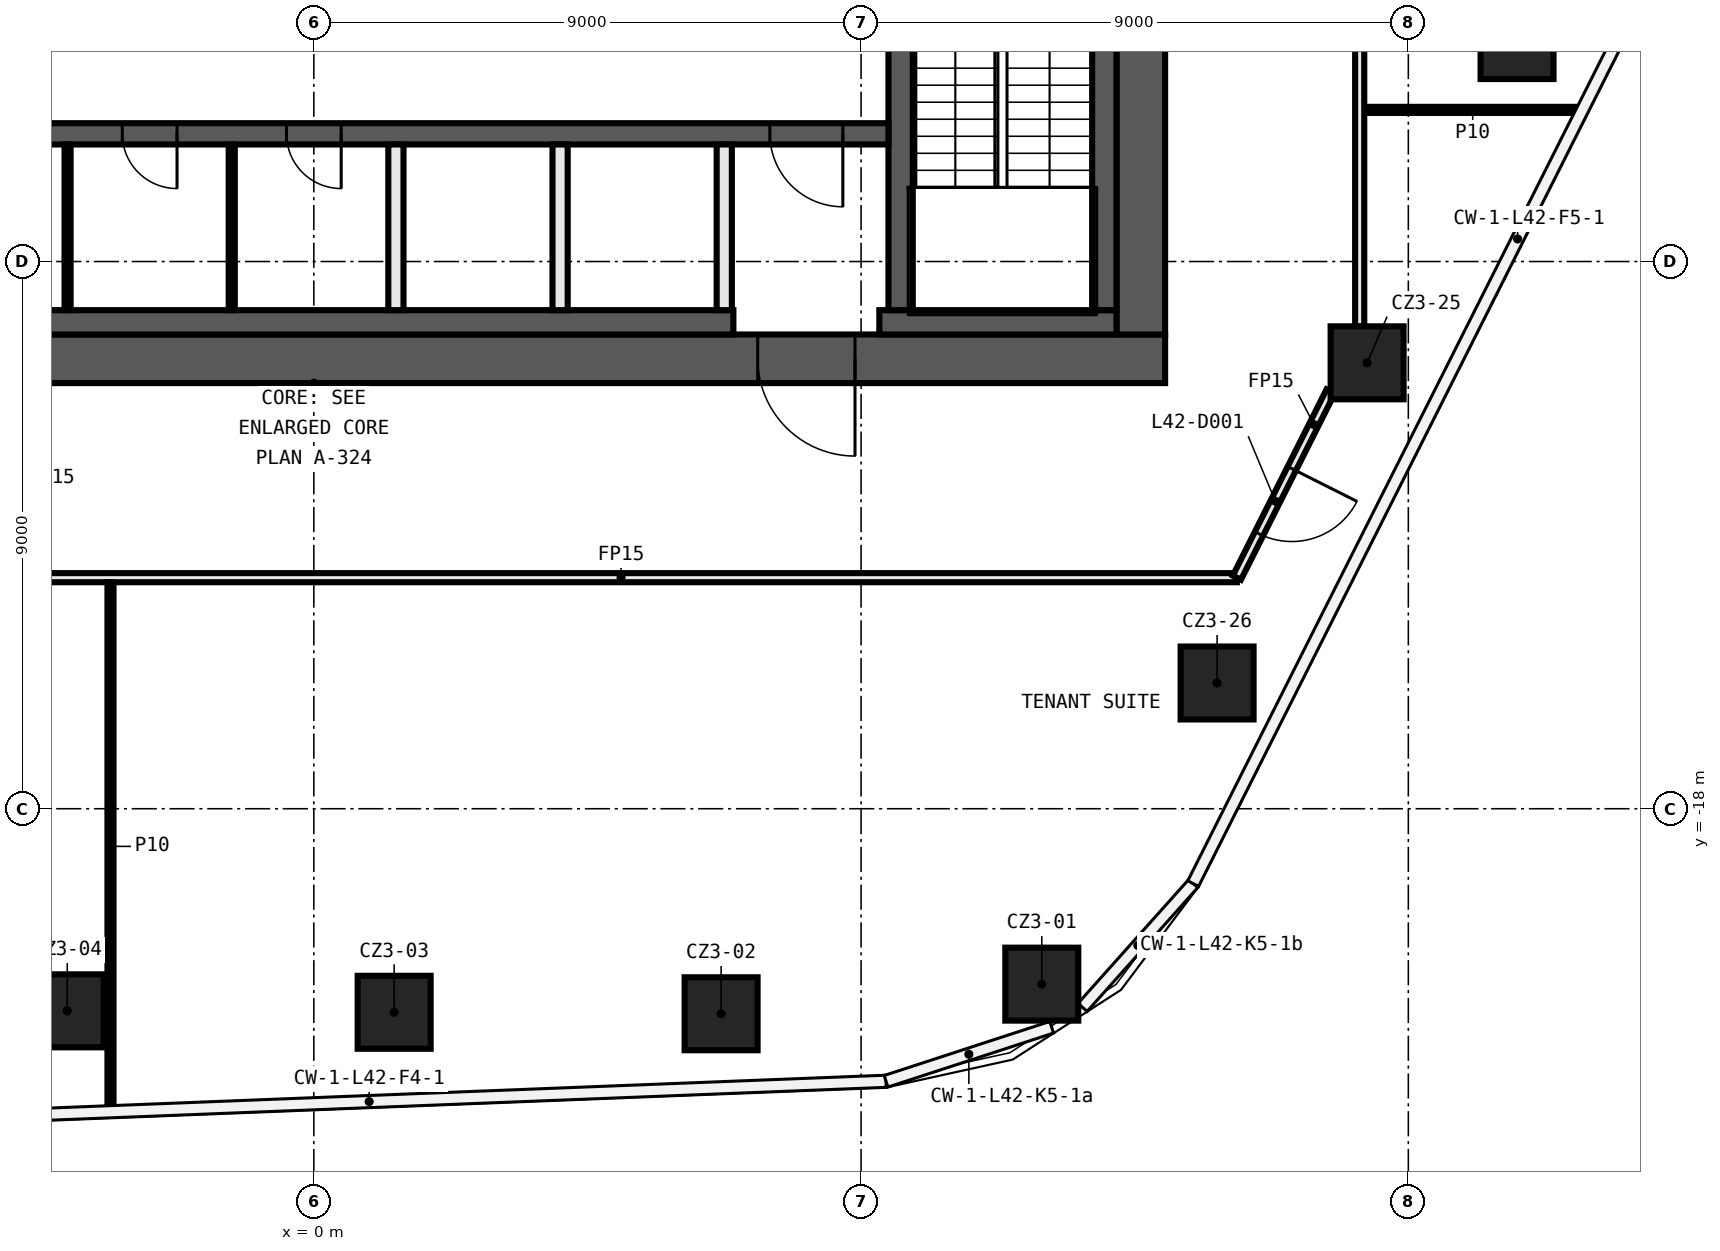
"""IFC4 building model, lengths in metres.
Left out: names, types, materials, properties, quantities, classifications, styles, units other than length and angle.
Written with IfcOpenShell. Run it as: python <this file> out.ifc"""

import sys

from ifc_helpers import new_model, si_unit, direction, frame, frame_2d, origin, origin_2d, place, context, subcontext, project, spatial, rectangle, extrude, element, fill, save


model = new_model("IFC4")
c1 = context("Model", 3, precision=1e-05, world=origin(), true_north=direction((0.0, 1.0)))
c2 = subcontext(c1, "Body", "Model", "MODEL_VIEW")
j1 = project(units=[si_unit("LENGTHUNIT", "METRE"), si_unit("PLANEANGLEUNIT", "RADIAN")], contexts=[c1])
p1 = place(None, origin())
s1 = spatial("IfcSite", under=j1, at=p1, CompositionType="ELEMENT")
p2 = place(p1, origin())
s2 = spatial("IfcBuilding", under=s1, at=p2, CompositionType="ELEMENT")
p3 = place(p2, frame((0.0, 0.0, 203.0)))
s3 = spatial("IfcBuildingStorey", under=s2, at=p3, CompositionType="ELEMENT", Elevation=203.0)
for number, where, z_axis, x_axis in (
    (1, (11.972, -20.885, 0.0), (0.0, 0.0, 1.0), (1.0, 0.0, 0.0)),
    (2, (6.698, -21.372, 0.0), (0.0, 0.0, 1.0), (1.0, 0.0, 0.0)),
    (3, (1.321, -21.348, 0.0), (0.0, 0.0, 1.0), (1.0, 0.0, 0.0)),
    (4, (-4.055, -21.324, 0.0), (0.0, 0.0, 1.0), (1.0, 0.0, 0.0)),
    (5, (19.788, -5.399, 0.0), (0.0, 0.0, 1.0), (1.0, 0.0, 0.0)),
    (6, (17.322, -10.666, 0.0), (0.0, 0.0, 1.0), (1.0, 0.0, 0.0)),
    (7, (14.855, -15.932, 0.0), (0.0, 0.0, 1.0), (1.0, 0.0, 0.0)),
):
    element("IfcColumn", number, at=place(p3, frame(where, z_axis=z_axis, x_axis=x_axis)), inside=s3, PredefinedType="COLUMN", context=c2, shape_type="SweptSolid", body=[
        extrude(rectangle(XDim=1.2, YDim=1.2, at=origin_2d()), origin(), (0.0, 0.0, 1.0), 3.82),
    ])
p4 = place(p3, frame((-5.075, -14.2, 0.0), z_axis=(0.0, 0.0, 1.0), x_axis=(1.0, 0.0, 0.0)))
e8 = element("IfcWall", 8, at=p4, inside=s3, PredefinedType="PARTITIONING", context=c2, shape_type="SweptSolid", body=[
    extrude(rectangle(XDim=20.255, YDim=0.15, at=frame_2d((10.127, 0.0))), origin(), (0.0, 0.0, 1.0), 3.82),
])
p5 = place(p3, frame((17.275, -6.506, 0.0), z_axis=(0.0, 0.0, 1.0), x_axis=(1.0, 0.0, 0.0)))
e9 = element("IfcWall", 9, at=p5, inside=s3, PredefinedType="PARTITIONING", context=c2, shape_type="SweptSolid", body=[
    extrude(rectangle(XDim=3.568, YDim=0.1, at=frame_2d((1.784, 0.0))), origin(), (0.0, 0.0, 1.0), 3.82),
])
p6 = place(p3, frame((16.722, -11.136, 0.0), z_axis=(0.0, 0.0, 1.0), x_axis=(-0.449461267312, -0.893299820433, 0.0)))
e10 = element("IfcWall", 10, at=p6, inside=s3, PredefinedType="PARTITIONING", context=c2, shape_type="SweptSolid", body=[
    extrude(rectangle(XDim=3.43, YDim=0.15, at=frame_2d((1.715, 0.0))), origin(), (0.0, 0.0, 1.0), 3.82),
])
p7 = place(p6, frame((1.421, 0.0, 0.0)))
e11 = element("IfcOpeningElement", 11, at=p7, cuts=e10, PredefinedType="OPENING", context=c2, shape_type="SweptSolid", body=[
    extrude(rectangle(XDim=1.2, YDim=2.1, at=frame_2d((0.6, 1.05))), frame((0.0, 0.085, 0.0), z_axis=(0.0, -1.0, 0.0), x_axis=(1.0, 0.0, 0.0)), (0.0, 0.0, 1.0), 0.17),
])
p8 = place(p3, frame((17.2, 13.106, 0.0), z_axis=(0.0, 0.0, 1.0), x_axis=(0.0, -1.0, 0.0)))
e12 = element("IfcWall", 12, at=p8, inside=s3, PredefinedType="PARTITIONING", context=c2, shape_type="SweptSolid", body=[
    extrude(rectangle(XDim=23.172, YDim=0.15, at=frame_2d((11.586, 0.0))), origin(), (0.0, 0.0, 1.0), 3.82),
])
p9 = place(p8, frame((4.412, 0.0, 0.0)))
e13 = element("IfcOpeningElement", 13, at=p9, cuts=e12, PredefinedType="OPENING", context=c2, shape_type="SweptSolid", body=[
    extrude(rectangle(XDim=1.2, YDim=2.1, at=frame_2d((0.6, 1.05))), frame((0.0, 0.085, 0.0), z_axis=(0.0, -1.0, 0.0), x_axis=(1.0, 0.0, 0.0)), (0.0, 0.0, 1.0), 0.17),
])
p10 = place(p3, frame((-3.344, -22.964, 0.0), z_axis=(0.0, 0.0, 1.0), x_axis=(0.0, 1.0, 0.0)))
e14 = element("IfcWall", 14, at=p10, inside=s3, PredefinedType="PARTITIONING", context=c2, shape_type="SweptSolid", body=[
    extrude(rectangle(XDim=8.689, YDim=0.1, at=frame_2d((4.344, 0.0))), origin(), (0.0, 0.0, 1.0), 3.82),
])
p11 = place(p3, frame((14.0, -10.6, 0.0), z_axis=(0.0, 0.0, 1.0), x_axis=(-1.0, 0.0, 0.0)))
e15 = element("IfcWall", 15, at=p11, inside=s3, PredefinedType="SHEAR", context=c2, shape_type="SweptSolid", body=[
    extrude(rectangle(XDim=28.0, YDim=0.8, at=frame_2d((14.0, 0.0))), origin(), (0.0, 0.0, 1.0), 3.82),
])
p12 = place(p11, frame((5.1, 0.0, 0.0)))
e16 = element("IfcOpeningElement", 16, at=p12, cuts=e15, PredefinedType="OPENING", context=c2, shape_type="SweptSolid", body=[
    extrude(rectangle(XDim=1.6, YDim=2.1, at=frame_2d((0.8, 1.05))), frame((0.0, 0.41, 0.0), z_axis=(0.0, -1.0, 0.0), x_axis=(1.0, 0.0, 0.0)), (0.0, 0.0, 1.0), 0.82),
])
p13 = place(p3, frame((13.6, 10.2, 0.0), z_axis=(0.0, 0.0, 1.0), x_axis=(0.0, -1.0, 0.0)))
e17 = element("IfcWall", 17, at=p13, inside=s3, PredefinedType="SHEAR", context=c2, shape_type="SweptSolid", body=[
    extrude(rectangle(XDim=20.4, YDim=0.8, at=frame_2d((10.2, 0.0))), origin(), (0.0, 0.0, 1.0), 3.82),
])
p14 = place(p3, frame((13.2, -10.0, 0.0), z_axis=(0.0, 0.0, 1.0), x_axis=(-1.0, 0.0, 0.0)))
e18 = element("IfcWall", 18, at=p14, inside=s3, PredefinedType="SHEAR", context=c2, shape_type="SweptSolid", body=[
    extrude(rectangle(XDim=3.9, YDim=0.4, at=frame_2d((1.95, 0.0))), origin(), (0.0, 0.0, 1.0), 3.82),
])
p15 = place(p3, frame((6.9, -10.0, 0.0), z_axis=(0.0, 0.0, 1.0), x_axis=(-1.0, 0.0, 0.0)))
e19 = element("IfcWall", 19, at=p15, inside=s3, PredefinedType="SHEAR", context=c2, shape_type="SweptSolid", body=[
    extrude(rectangle(XDim=20.1, YDim=0.4, at=frame_2d((10.05, 0.0))), origin(), (0.0, 0.0, 1.0), 3.82),
])
p16 = place(p3, frame((13.0, 9.8, 0.0), z_axis=(0.0, 0.0, 1.0), x_axis=(0.0, -1.0, 0.0)))
e20 = element("IfcWall", 20, at=p16, inside=s3, PredefinedType="SHEAR", context=c2, shape_type="SweptSolid", body=[
    extrude(rectangle(XDim=19.6, YDim=0.4, at=frame_2d((9.8, 0.0))), origin(), (0.0, 0.0, 1.0), 3.82),
])
p17 = place(p3, frame((9.65, -2.3, 0.0), z_axis=(0.0, 0.0, 1.0), x_axis=(0.0, -1.0, 0.0)))
e21 = element("IfcWall", 21, at=p17, inside=s3, PredefinedType="SHEAR", context=c2, shape_type="SweptSolid", body=[
    extrude(rectangle(XDim=7.5, YDim=0.4, at=frame_2d((3.75, 0.0))), origin(), (0.0, 0.0, 1.0), 3.82),
])
p18 = place(p17, frame((1.2, 0.0, 0.0)))
e22 = element("IfcOpeningElement", 22, at=p18, cuts=e21, PredefinedType="OPENING", context=c2, shape_type="SweptSolid", body=[
    extrude(rectangle(XDim=1.2, YDim=2.1, at=frame_2d((0.6, 1.05))), frame((0.0, 0.21, 0.0), z_axis=(0.0, -1.0, 0.0), x_axis=(1.0, 0.0, 0.0)), (0.0, 0.0, 1.0), 0.42),
])
p19 = place(p3, frame((9.45, -6.9, 0.0), z_axis=(0.0, 0.0, 1.0), x_axis=(-1.0, 0.0, 0.0)))
e23 = element("IfcWall", 23, at=p19, inside=s3, PredefinedType="SHEAR", context=c2, shape_type="SweptSolid", body=[
    extrude(rectangle(XDim=18.9, YDim=0.35, at=frame_2d((9.45, 0.0))), origin(), (0.0, 0.0, 1.0), 3.82),
])
p20 = place(p19, frame((0.75, 0.0, 0.0)))
e24 = element("IfcOpeningElement", 24, at=p20, cuts=e23, PredefinedType="OPENING", context=c2, shape_type="SweptSolid", body=[
    extrude(rectangle(XDim=1.2, YDim=2.1, at=frame_2d((0.6, 1.05))), frame((0.0, 0.185, 0.0), z_axis=(0.0, -1.0, 0.0), x_axis=(1.0, 0.0, 0.0)), (0.0, 0.0, 1.0), 0.37),
])
p21 = place(p19, frame((17.1, 0.0, 0.0)))
e25 = element("IfcOpeningElement", 25, at=p21, cuts=e23, PredefinedType="OPENING", context=c2, shape_type="SweptSolid", body=[
    extrude(rectangle(XDim=0.9, YDim=2.1, at=frame_2d((0.45, 1.05))), frame((0.0, 0.185, 0.0), z_axis=(0.0, -1.0, 0.0), x_axis=(1.0, 0.0, 0.0)), (0.0, 0.0, 1.0), 0.37),
])
p22 = place(p19, frame((14.4, 0.0, 0.0)))
e26 = element("IfcOpeningElement", 26, at=p22, cuts=e23, PredefinedType="OPENING", context=c2, shape_type="SweptSolid", body=[
    extrude(rectangle(XDim=0.9, YDim=2.1, at=frame_2d((0.45, 1.05))), frame((0.0, 0.185, 0.0), z_axis=(0.0, -1.0, 0.0), x_axis=(1.0, 0.0, 0.0)), (0.0, 0.0, 1.0), 0.37),
])
p23 = place(p19, frame((11.7, 0.0, 0.0)))
e27 = element("IfcOpeningElement", 27, at=p23, cuts=e23, PredefinedType="OPENING", context=c2, shape_type="SweptSolid", body=[
    extrude(rectangle(XDim=0.9, YDim=2.1, at=frame_2d((0.45, 1.05))), frame((0.0, 0.185, 0.0), z_axis=(0.0, -1.0, 0.0), x_axis=(1.0, 0.0, 0.0)), (0.0, 0.0, 1.0), 0.37),
])
p24 = place(p19, frame((9.0, 0.0, 0.0)))
e28 = element("IfcOpeningElement", 28, at=p24, cuts=e23, PredefinedType="OPENING", context=c2, shape_type="SweptSolid", body=[
    extrude(rectangle(XDim=0.9, YDim=2.1, at=frame_2d((0.45, 1.05))), frame((0.0, 0.185, 0.0), z_axis=(0.0, -1.0, 0.0), x_axis=(1.0, 0.0, 0.0)), (0.0, 0.0, 1.0), 0.37),
])
for number, where, z_axis, x_axis in (
    (29, (6.75, -9.8, 0.0), (0.0, 0.0, 1.0), (0.0, 1.0, 0.0)),
    (30, (4.05, -9.8, 0.0), (0.0, 0.0, 1.0), (0.0, 1.0, 0.0)),
    (31, (1.35, -9.8, 0.0), (0.0, 0.0, 1.0), (0.0, 1.0, 0.0)),
):
    element("IfcWall", number, at=place(p3, frame(where, z_axis=z_axis, x_axis=x_axis)), inside=s3, PredefinedType="SOLIDWALL", context=c2, shape_type="SweptSolid", body=[
        extrude(rectangle(XDim=2.725, YDim=0.25, at=frame_2d((1.363, 0.0))), origin(), (0.0, 0.0, 1.0), 3.82),
    ])
for number, where, z_axis, x_axis in (
    (32, (-1.35, -9.8, 0.0), (0.0, 0.0, 1.0), (0.0, 1.0, 0.0)),
    (33, (-4.05, -9.8, 0.0), (0.0, 0.0, 1.0), (0.0, 1.0, 0.0)),
):
    element("IfcWall", number, at=place(p3, frame(where, z_axis=z_axis, x_axis=x_axis)), inside=s3, PredefinedType="PARTITIONING", context=c2, shape_type="SweptSolid", body=[
        extrude(rectangle(XDim=2.725, YDim=0.1, at=frame_2d((1.363, 0.0))), origin(), (0.0, 0.0, 1.0), 3.82),
    ])
p25 = place(p7, origin())
e34 = element("IfcDoor", 34, at=p25, inside=s3, OperationType="SINGLE_SWING_RIGHT", PredefinedType="DOOR", context=c2, shape_type="SweptSolid", body=[
    extrude(rectangle(XDim=1.2, YDim=2.1, at=frame_2d((0.6, 1.05))), frame((0.0, 0.025, 0.0), z_axis=(0.0, -1.0, 0.0), x_axis=(1.0, 0.0, 0.0)), (0.0, 0.0, 1.0), 0.05),
])
fill(e11, e34)
p26 = place(p12, origin())
e35 = element("IfcDoor", 35, at=p26, inside=s3, OperationType="DOUBLE_DOOR_SINGLE_SWING", PredefinedType="DOOR", context=c2, shape_type="SweptSolid", body=[
    extrude(rectangle(XDim=1.6, YDim=2.1, at=frame_2d((0.8, 1.05))), frame((0.0, 0.025, 0.0), z_axis=(0.0, -1.0, 0.0), x_axis=(1.0, 0.0, 0.0)), (0.0, 0.0, 1.0), 0.05),
])
fill(e16, e35)
p27 = place(p20, origin())
e36 = element("IfcDoor", 36, at=p27, inside=s3, OperationType="SINGLE_SWING_LEFT", PredefinedType="DOOR", context=c2, shape_type="SweptSolid", body=[
    extrude(rectangle(XDim=1.2, YDim=2.1, at=frame_2d((0.6, 1.05))), frame((0.0, 0.025, 0.0), z_axis=(0.0, -1.0, 0.0), x_axis=(1.0, 0.0, 0.0)), (0.0, 0.0, 1.0), 0.05),
])
fill(e24, e36)
p28 = place(p23, origin())
e37 = element("IfcDoor", 37, at=p28, inside=s3, OperationType="SINGLE_SWING_LEFT", PredefinedType="DOOR", context=c2, shape_type="SweptSolid", body=[
    extrude(rectangle(XDim=0.9, YDim=2.1, at=frame_2d((0.45, 1.05))), frame((0.0, 0.025, 0.0), z_axis=(0.0, -1.0, 0.0), x_axis=(1.0, 0.0, 0.0)), (0.0, 0.0, 1.0), 0.05),
])
fill(e27, e37)
p29 = place(p24, origin())
e38 = element("IfcDoor", 38, at=p29, inside=s3, OperationType="SINGLE_SWING_RIGHT", PredefinedType="DOOR", context=c2, shape_type="SweptSolid", body=[
    extrude(rectangle(XDim=0.9, YDim=2.1, at=frame_2d((0.45, 1.05))), frame((0.0, 0.025, 0.0), z_axis=(0.0, -1.0, 0.0), x_axis=(1.0, 0.0, 0.0)), (0.0, 0.0, 1.0), 0.05),
])
fill(e28, e38)
save(model, sys.argv[1])
